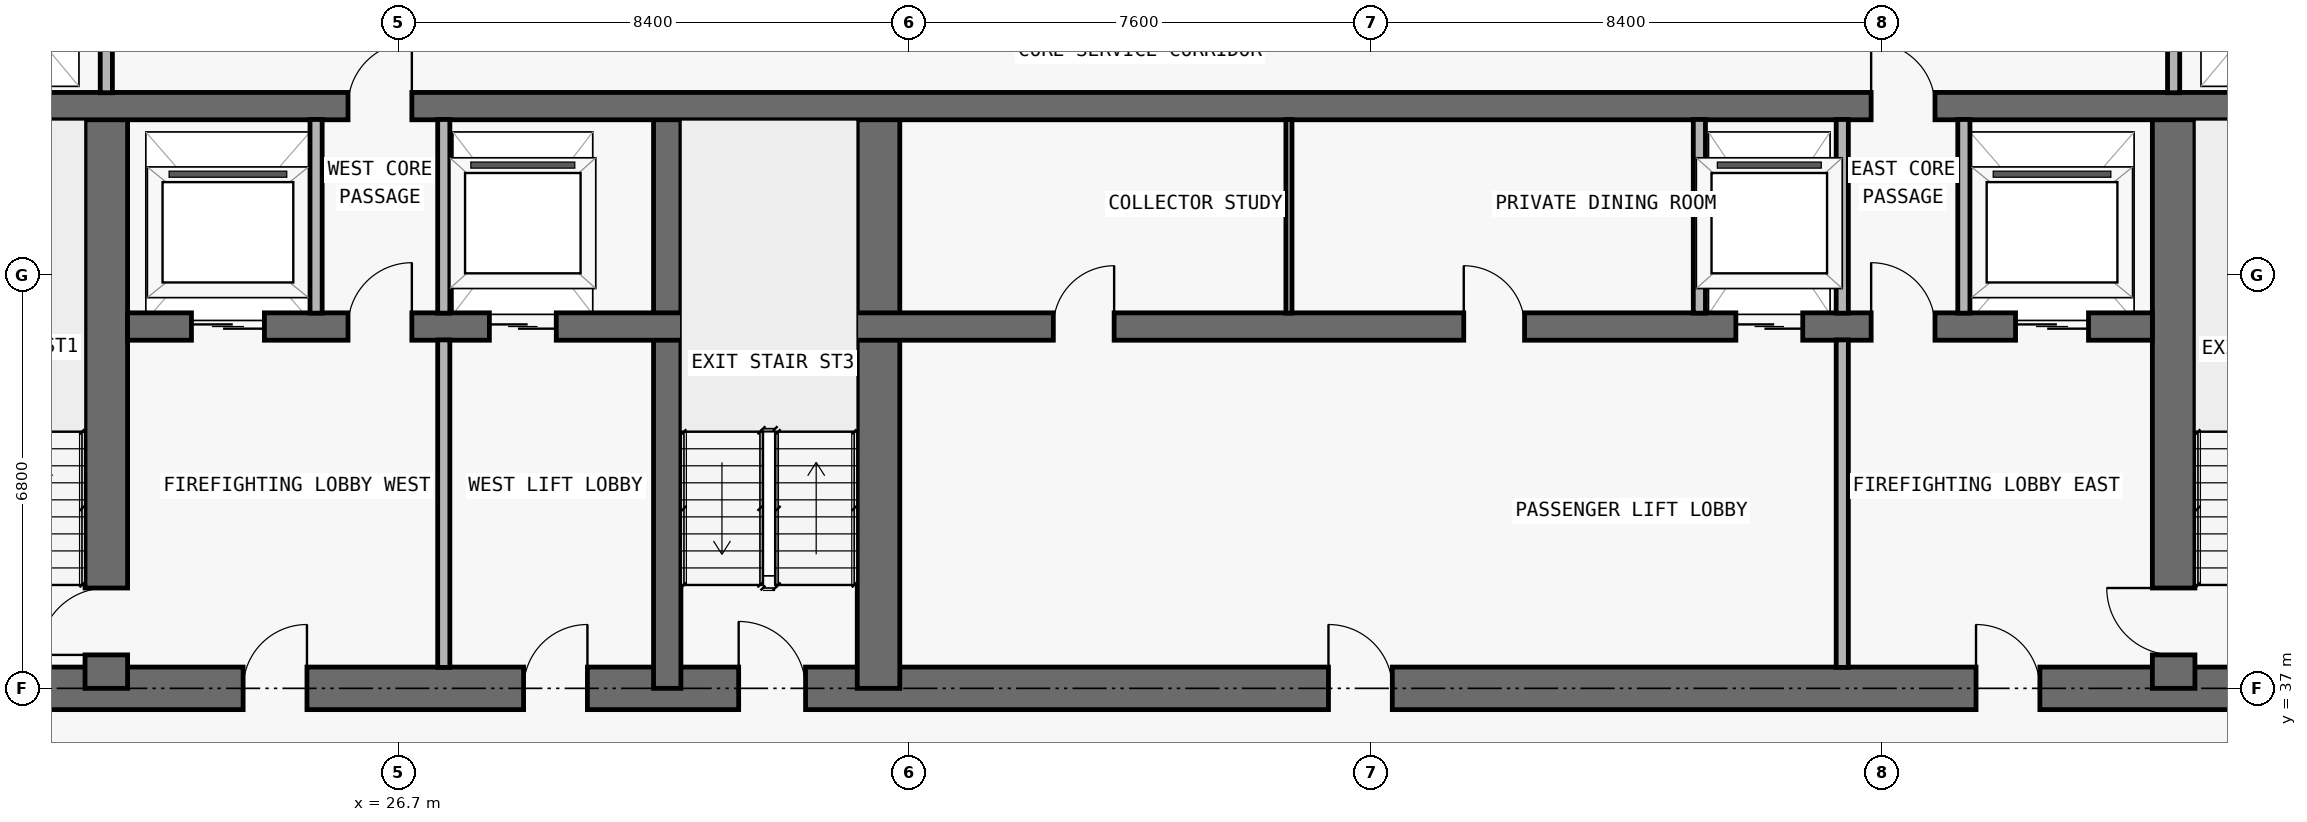
"""IFC4 building model, lengths in metres.
Left out: names, types, materials, properties, quantities, classifications, styles, units other than length and angle.
Written with IfcOpenShell. Run it as: python <this file> out.ifc"""

import sys

from ifc_helpers import new_model, si_unit, direction, frame, frame_2d, origin, place, context, subcontext, project, spatial, rectangle, extrude, element, fill, save


model = new_model("IFC4")
c1 = context("Model", 3, precision=1e-05, world=origin(), true_north=direction((0.0, 1.0)))
c2 = subcontext(c1, "Body", "Model", "MODEL_VIEW")
j1 = project(units=[si_unit("LENGTHUNIT", "METRE"), si_unit("PLANEANGLEUNIT", "RADIAN")], contexts=[c1])
p1 = place(None, origin())
s1 = spatial("IfcSite", under=j1, at=p1, CompositionType="ELEMENT")
p2 = place(p1, origin())
s2 = spatial("IfcBuilding", under=s1, at=p2, CompositionType="ELEMENT")
p3 = place(p2, frame((0.0, 0.0, 195.0)))
s3 = spatial("IfcBuildingStorey", under=s2, at=p3, CompositionType="ELEMENT", Elevation=195.0)
p4 = place(p3, frame((17.95, 37.0, 0.0), z_axis=(0.0, 0.0, 1.0), x_axis=(1.0, 0.0, 0.0)))
e1 = element("IfcWall", 1, at=p4, inside=s3, PredefinedType="SHEAR", context=c2, shape_type="SweptSolid", body=[
    extrude(rectangle(XDim=41.9, YDim=0.7, at=frame_2d((20.95, 0.0))), origin(), (0.0, 0.0, 1.0), 3.05),
])
p5 = place(p4, frame((14.35, 0.0, 0.0)))
e2 = element("IfcOpeningElement", 2, at=p5, cuts=e1, PredefinedType="OPENING", context=c2, shape_type="SweptSolid", body=[
    extrude(rectangle(XDim=1.1, YDim=2.15, at=frame_2d((0.55, 1.075))), frame((0.0, 0.36, 0.0), z_axis=(0.0, -1.0, 0.0), x_axis=(1.0, 0.0, 0.0)), (0.0, 0.0, 1.0), 0.72),
])
p6 = place(p4, frame((6.2, 0.0, 0.0)))
e3 = element("IfcOpeningElement", 3, at=p6, cuts=e1, PredefinedType="OPENING", context=c2, shape_type="SweptSolid", body=[
    extrude(rectangle(XDim=1.05, YDim=2.15, at=frame_2d((0.525, 1.075))), frame((0.0, 0.36, 0.0), z_axis=(0.0, -1.0, 0.0), x_axis=(1.0, 0.0, 0.0)), (0.0, 0.0, 1.0), 0.72),
])
p7 = place(p4, frame((34.7, 0.0, 0.0)))
e4 = element("IfcOpeningElement", 4, at=p7, cuts=e1, PredefinedType="OPENING", context=c2, shape_type="SweptSolid", body=[
    extrude(rectangle(XDim=1.05, YDim=2.15, at=frame_2d((0.525, 1.075))), frame((0.0, 0.36, 0.0), z_axis=(0.0, -1.0, 0.0), x_axis=(1.0, 0.0, 0.0)), (0.0, 0.0, 1.0), 0.72),
])
p8 = place(p4, frame((10.812, 0.0, 0.0)))
e5 = element("IfcOpeningElement", 5, at=p8, cuts=e1, PredefinedType="OPENING", context=c2, shape_type="SweptSolid", body=[
    extrude(rectangle(XDim=1.05, YDim=2.15, at=frame_2d((0.525, 1.075))), frame((0.0, 0.36, 0.0), z_axis=(0.0, -1.0, 0.0), x_axis=(1.0, 0.0, 0.0)), (0.0, 0.0, 1.0), 0.72),
])
p9 = place(p4, frame((24.05, 0.0, 0.0)))
e6 = element("IfcOpeningElement", 6, at=p9, cuts=e1, PredefinedType="OPENING", context=c2, shape_type="SweptSolid", body=[
    extrude(rectangle(XDim=1.05, YDim=2.15, at=frame_2d((0.525, 1.075))), frame((0.0, 0.36, 0.0), z_axis=(0.0, -1.0, 0.0), x_axis=(1.0, 0.0, 0.0)), (0.0, 0.0, 1.0), 0.72),
])
p10 = place(p3, frame((21.9, 37.0, 0.0), z_axis=(0.0, 0.0, 1.0), x_axis=(0.0, 1.0, 0.0)))
e7 = element("IfcWall", 7, at=p10, inside=s3, PredefinedType="SHEAR", context=c2, shape_type="SweptSolid", body=[
    extrude(rectangle(XDim=9.575, YDim=0.7, at=frame_2d((4.788, 0.0))), origin(), (0.0, 0.0, 1.0), 3.05),
])
p11 = place(p10, frame((0.55, 0.0, 0.0)))
e8 = element("IfcOpeningElement", 8, at=p11, cuts=e7, PredefinedType="OPENING", context=c2, shape_type="SweptSolid", body=[
    extrude(rectangle(XDim=1.1, YDim=2.15, at=frame_2d((0.55, 1.075))), frame((0.0, 0.36, 0.0), z_axis=(0.0, -1.0, 0.0), x_axis=(1.0, 0.0, 0.0)), (0.0, 0.0, 1.0), 0.72),
])
p12 = place(p3, frame((55.9, 37.0, 0.0), z_axis=(0.0, 0.0, 1.0), x_axis=(0.0, 1.0, 0.0)))
e9 = element("IfcWall", 9, at=p12, inside=s3, PredefinedType="SHEAR", context=c2, shape_type="SweptSolid", body=[
    extrude(rectangle(XDim=9.575, YDim=0.7, at=frame_2d((4.788, 0.0))), origin(), (0.0, 0.0, 1.0), 3.05),
])
p13 = place(p12, frame((0.55, 0.0, 0.0)))
e10 = element("IfcOpeningElement", 10, at=p13, cuts=e9, PredefinedType="OPENING", context=c2, shape_type="SweptSolid", body=[
    extrude(rectangle(XDim=1.1, YDim=2.15, at=frame_2d((0.55, 1.075))), frame((0.0, 0.36, 0.0), z_axis=(0.0, -1.0, 0.0), x_axis=(1.0, 0.0, 0.0)), (0.0, 0.0, 1.0), 0.72),
])
p14 = place(p3, frame((31.125, 37.0, 0.0), z_axis=(0.0, 0.0, 1.0), x_axis=(0.0, 1.0, 0.0)))
e11 = element("IfcWall", 11, at=p14, inside=s3, PredefinedType="SHEAR", context=c2, shape_type="SweptSolid", body=[
    extrude(rectangle(XDim=9.575, YDim=0.45, at=frame_2d((4.788, 0.0))), origin(), (0.0, 0.0, 1.0), 3.05),
])
p15 = place(p3, frame((34.6, 37.0, 0.0), z_axis=(0.0, 0.0, 1.0), x_axis=(0.0, 1.0, 0.0)))
e12 = element("IfcWall", 12, at=p15, inside=s3, PredefinedType="SHEAR", context=c2, shape_type="SweptSolid", body=[
    extrude(rectangle(XDim=9.575, YDim=0.7, at=frame_2d((4.788, 0.0))), origin(), (0.0, 0.0, 1.0), 3.05),
])
p16 = place(p3, frame((22.25, 42.95, 0.0), z_axis=(0.0, 0.0, 1.0), x_axis=(1.0, 0.0, 0.0)))
e13 = element("IfcWall", 13, at=p16, inside=s3, PredefinedType="SHEAR", context=c2, shape_type="SweptSolid", body=[
    extrude(rectangle(XDim=33.3, YDim=0.45, at=frame_2d((16.65, 0.0))), origin(), (0.0, 0.0, 1.0), 3.05),
])
p17 = place(p16, frame((1.05, 0.0, 0.0)))
e14 = element("IfcOpeningElement", 14, at=p17, cuts=e13, PredefinedType="OPENING", context=c2, shape_type="SweptSolid", body=[
    extrude(rectangle(XDim=1.2, YDim=2.2, at=frame_2d((0.6, 1.1))), frame((0.0, 0.235, 0.0), z_axis=(0.0, -1.0, 0.0), x_axis=(1.0, 0.0, 0.0)), (0.0, 0.0, 1.0), 0.47),
])
p18 = place(p16, frame((31.05, 0.0, 0.0)))
e15 = element("IfcOpeningElement", 15, at=p18, cuts=e13, PredefinedType="OPENING", context=c2, shape_type="SweptSolid", body=[
    extrude(rectangle(XDim=1.2, YDim=2.2, at=frame_2d((0.6, 1.1))), frame((0.0, 0.235, 0.0), z_axis=(0.0, -1.0, 0.0), x_axis=(1.0, 0.0, 0.0)), (0.0, 0.0, 1.0), 0.47),
])
p19 = place(p16, frame((26.45, 0.0, 0.0)))
e16 = element("IfcOpeningElement", 16, at=p19, cuts=e13, PredefinedType="OPENING", context=c2, shape_type="SweptSolid", body=[
    extrude(rectangle(XDim=1.1, YDim=2.2, at=frame_2d((0.55, 1.1))), frame((0.0, 0.235, 0.0), z_axis=(0.0, -1.0, 0.0), x_axis=(1.0, 0.0, 0.0)), (0.0, 0.0, 1.0), 0.47),
])
p20 = place(p16, frame((5.95, 0.0, 0.0)))
e17 = element("IfcOpeningElement", 17, at=p20, cuts=e13, PredefinedType="OPENING", context=c2, shape_type="SweptSolid", body=[
    extrude(rectangle(XDim=1.1, YDim=2.2, at=frame_2d((0.55, 1.1))), frame((0.0, 0.235, 0.0), z_axis=(0.0, -1.0, 0.0), x_axis=(1.0, 0.0, 0.0)), (0.0, 0.0, 1.0), 0.47),
])
p21 = place(p16, frame((3.625, 0.0, 0.0)))
e18 = element("IfcOpeningElement", 18, at=p21, cuts=e13, PredefinedType="OPENING", context=c2, shape_type="SweptSolid", body=[
    extrude(rectangle(XDim=1.05, YDim=2.15, at=frame_2d((0.525, 1.075))), frame((0.0, 0.235, 0.0), z_axis=(0.0, -1.0, 0.0), x_axis=(1.0, 0.0, 0.0)), (0.0, 0.0, 1.0), 0.47),
])
p22 = place(p16, frame((28.675, 0.0, 0.0)))
e19 = element("IfcOpeningElement", 19, at=p22, cuts=e13, PredefinedType="OPENING", context=c2, shape_type="SweptSolid", body=[
    extrude(rectangle(XDim=1.05, YDim=2.15, at=frame_2d((0.525, 1.075))), frame((0.0, 0.235, 0.0), z_axis=(0.0, -1.0, 0.0), x_axis=(1.0, 0.0, 0.0)), (0.0, 0.0, 1.0), 0.47),
])
p23 = place(p16, frame((15.225, 0.0, 0.0)))
e20 = element("IfcOpeningElement", 20, at=p23, cuts=e13, PredefinedType="OPENING", context=c2, shape_type="SweptSolid", body=[
    extrude(rectangle(XDim=1.0, YDim=2.2, at=frame_2d((0.5, 1.1))), frame((0.0, 0.235, 0.0), z_axis=(0.0, -1.0, 0.0), x_axis=(1.0, 0.0, 0.0)), (0.0, 0.0, 1.0), 0.47),
])
p24 = place(p16, frame((21.975, 0.0, 0.0)))
e21 = element("IfcOpeningElement", 21, at=p24, cuts=e13, PredefinedType="OPENING", context=c2, shape_type="SweptSolid", body=[
    extrude(rectangle(XDim=1.0, YDim=2.2, at=frame_2d((0.5, 1.1))), frame((0.0, 0.235, 0.0), z_axis=(0.0, -1.0, 0.0), x_axis=(1.0, 0.0, 0.0)), (0.0, 0.0, 1.0), 0.47),
])
p25 = place(p3, frame((18.3, 46.575, 0.0), z_axis=(0.0, 0.0, 1.0), x_axis=(1.0, 0.0, 0.0)))
e22 = element("IfcWall", 22, at=p25, inside=s3, PredefinedType="SHEAR", context=c2, shape_type="SweptSolid", body=[
    extrude(rectangle(XDim=41.2, YDim=0.45, at=frame_2d((20.6, 0.0))), origin(), (0.0, 0.0, 1.0), 3.05),
])
p26 = place(p25, frame((7.575, 0.0, 0.0)))
e23 = element("IfcOpeningElement", 23, at=p26, cuts=e22, PredefinedType="OPENING", context=c2, shape_type="SweptSolid", body=[
    extrude(rectangle(XDim=1.05, YDim=2.15, at=frame_2d((0.525, 1.075))), frame((0.0, 0.235, 0.0), z_axis=(0.0, -1.0, 0.0), x_axis=(1.0, 0.0, 0.0)), (0.0, 0.0, 1.0), 0.47),
])
p27 = place(p25, frame((32.625, 0.0, 0.0)))
e24 = element("IfcOpeningElement", 24, at=p27, cuts=e22, PredefinedType="OPENING", context=c2, shape_type="SweptSolid", body=[
    extrude(rectangle(XDim=1.05, YDim=2.15, at=frame_2d((0.525, 1.075))), frame((0.0, 0.235, 0.0), z_axis=(0.0, -1.0, 0.0), x_axis=(1.0, 0.0, 0.0)), (0.0, 0.0, 1.0), 0.47),
])
p28 = place(p3, frame((21.9, 46.795, 0.0), z_axis=(0.0, 0.0, 1.0), x_axis=(0.0, 1.0, 0.0)))
e25 = element("IfcWall", 25, at=p28, inside=s3, PredefinedType="PARTITIONING", context=c2, shape_type="SweptSolid", body=[
    extrude(rectangle(XDim=3.16, YDim=0.2, at=frame_2d((1.58, 0.0))), origin(), (0.0, 0.0, 1.0), 3.05),
])
p29 = place(p3, frame((25.35, 43.17, 0.0), z_axis=(0.0, 0.0, 1.0), x_axis=(0.0, 1.0, 0.0)))
e26 = element("IfcWall", 26, at=p29, inside=s3, PredefinedType="PARTITIONING", context=c2, shape_type="SweptSolid", body=[
    extrude(rectangle(XDim=3.185, YDim=0.2, at=frame_2d((1.593, 0.0))), origin(), (0.0, 0.0, 1.0), 3.05),
])
p30 = place(p3, frame((27.45, 37.345, 0.0), z_axis=(0.0, 0.0, 1.0), x_axis=(0.0, 1.0, 0.0)))
e27 = element("IfcWall", 27, at=p30, inside=s3, PredefinedType="PARTITIONING", context=c2, shape_type="SweptSolid", body=[
    extrude(rectangle(XDim=5.385, YDim=0.2, at=frame_2d((2.692, 0.0))), origin(), (0.0, 0.0, 1.0), 3.05),
])
p31 = place(p3, frame((27.45, 43.17, 0.0), z_axis=(0.0, 0.0, 1.0), x_axis=(0.0, 1.0, 0.0)))
e28 = element("IfcWall", 28, at=p31, inside=s3, PredefinedType="PARTITIONING", context=c2, shape_type="SweptSolid", body=[
    extrude(rectangle(XDim=3.185, YDim=0.2, at=frame_2d((1.593, 0.0))), origin(), (0.0, 0.0, 1.0), 3.05),
])
p32 = place(p3, frame((41.35, 43.17, 0.0), z_axis=(0.0, 0.0, 1.0), x_axis=(0.0, 1.0, 0.0)))
e29 = element("IfcWall", 29, at=p32, inside=s3, PredefinedType="MOVABLE", context=c2, shape_type="SweptSolid", body=[
    extrude(rectangle(XDim=3.185, YDim=0.1, at=frame_2d((1.593, 0.0))), origin(), (0.0, 0.0, 1.0), 3.05),
])
p33 = place(p3, frame((48.1, 43.17, 0.0), z_axis=(0.0, 0.0, 1.0), x_axis=(0.0, 1.0, 0.0)))
e30 = element("IfcWall", 30, at=p33, inside=s3, PredefinedType="PARTITIONING", context=c2, shape_type="SweptSolid", body=[
    extrude(rectangle(XDim=3.185, YDim=0.2, at=frame_2d((1.593, 0.0))), origin(), (0.0, 0.0, 1.0), 3.05),
])
p34 = place(p3, frame((50.45, 37.345, 0.0), z_axis=(0.0, 0.0, 1.0), x_axis=(0.0, 1.0, 0.0)))
e31 = element("IfcWall", 31, at=p34, inside=s3, PredefinedType="PARTITIONING", context=c2, shape_type="SweptSolid", body=[
    extrude(rectangle(XDim=5.385, YDim=0.2, at=frame_2d((2.692, 0.0))), origin(), (0.0, 0.0, 1.0), 3.05),
])
for number, where, z_axis, x_axis in (
    (32, (50.45, 43.17, 0.0), (0.0, 0.0, 1.0), (0.0, 1.0, 0.0)),
    (33, (52.45, 43.17, 0.0), (0.0, 0.0, 1.0), (0.0, 1.0, 0.0)),
):
    element("IfcWall", number, at=place(p3, frame(where, z_axis=z_axis, x_axis=x_axis)), inside=s3, PredefinedType="PARTITIONING", context=c2, shape_type="SweptSolid", body=[
        extrude(rectangle(XDim=3.185, YDim=0.2, at=frame_2d((1.593, 0.0))), origin(), (0.0, 0.0, 1.0), 3.05),
    ])
p35 = place(p3, frame((55.9, 46.795, 0.0), z_axis=(0.0, 0.0, 1.0), x_axis=(0.0, 1.0, 0.0)))
e34 = element("IfcWall", 34, at=p35, inside=s3, PredefinedType="PARTITIONING", context=c2, shape_type="SweptSolid", body=[
    extrude(rectangle(XDim=3.16, YDim=0.2, at=frame_2d((1.58, 0.0))), origin(), (0.0, 0.0, 1.0), 3.05),
])
p36 = place(p17, origin())
e35 = element("IfcDoor", 35, at=p36, inside=s3, OperationType="DOUBLE_DOOR_SLIDING", PredefinedType="DOOR", context=c2, shape_type="SweptSolid", body=[
    extrude(rectangle(XDim=1.2, YDim=2.2, at=frame_2d((0.6, 1.1))), frame((0.0, 0.025, 0.0), z_axis=(0.0, -1.0, 0.0), x_axis=(1.0, 0.0, 0.0)), (0.0, 0.0, 1.0), 0.05),
])
fill(e14, e35)
p37 = place(p18, origin())
e36 = element("IfcDoor", 36, at=p37, inside=s3, OperationType="DOUBLE_DOOR_SLIDING", PredefinedType="DOOR", context=c2, shape_type="SweptSolid", body=[
    extrude(rectangle(XDim=1.2, YDim=2.2, at=frame_2d((0.6, 1.1))), frame((0.0, 0.025, 0.0), z_axis=(0.0, -1.0, 0.0), x_axis=(1.0, 0.0, 0.0)), (0.0, 0.0, 1.0), 0.05),
])
fill(e15, e36)
p38 = place(p19, origin())
e37 = element("IfcDoor", 37, at=p38, inside=s3, OperationType="DOUBLE_DOOR_SLIDING", PredefinedType="DOOR", context=c2, shape_type="SweptSolid", body=[
    extrude(rectangle(XDim=1.1, YDim=2.2, at=frame_2d((0.55, 1.1))), frame((0.0, 0.025, 0.0), z_axis=(0.0, -1.0, 0.0), x_axis=(1.0, 0.0, 0.0)), (0.0, 0.0, 1.0), 0.05),
])
fill(e16, e37)
p39 = place(p20, origin())
e38 = element("IfcDoor", 38, at=p39, inside=s3, OperationType="DOUBLE_DOOR_SLIDING", PredefinedType="DOOR", context=c2, shape_type="SweptSolid", body=[
    extrude(rectangle(XDim=1.1, YDim=2.2, at=frame_2d((0.55, 1.1))), frame((0.0, 0.025, 0.0), z_axis=(0.0, -1.0, 0.0), x_axis=(1.0, 0.0, 0.0)), (0.0, 0.0, 1.0), 0.05),
])
fill(e17, e38)
p40 = place(p5, origin())
e39 = element("IfcDoor", 39, at=p40, inside=s3, OperationType="SINGLE_SWING_LEFT", PredefinedType="DOOR", context=c2, shape_type="SweptSolid", body=[
    extrude(rectangle(XDim=1.1, YDim=2.15, at=frame_2d((0.55, 1.075))), frame((0.0, 0.025, 0.0), z_axis=(0.0, -1.0, 0.0), x_axis=(1.0, 0.0, 0.0)), (0.0, 0.0, 1.0), 0.05),
])
fill(e2, e39)
p41 = place(p6, origin())
e40 = element("IfcDoor", 40, at=p41, inside=s3, OperationType="SINGLE_SWING_RIGHT", PredefinedType="DOOR", context=c2, shape_type="SweptSolid", body=[
    extrude(rectangle(XDim=1.05, YDim=2.15, at=frame_2d((0.525, 1.075))), frame((0.0, 0.025, 0.0), z_axis=(0.0, -1.0, 0.0), x_axis=(1.0, 0.0, 0.0)), (0.0, 0.0, 1.0), 0.05),
])
fill(e3, e40)
p42 = place(p11, origin())
e41 = element("IfcDoor", 41, at=p42, inside=s3, OperationType="SINGLE_SWING_LEFT", PredefinedType="DOOR", context=c2, shape_type="SweptSolid", body=[
    extrude(rectangle(XDim=1.1, YDim=2.15, at=frame_2d((0.55, 1.075))), frame((0.0, 0.025, 0.0), z_axis=(0.0, -1.0, 0.0), x_axis=(1.0, 0.0, 0.0)), (0.0, 0.0, 1.0), 0.05),
])
fill(e8, e41)
p43 = place(p21, origin())
e42 = element("IfcDoor", 42, at=p43, inside=s3, OperationType="SINGLE_SWING_RIGHT", PredefinedType="DOOR", context=c2, shape_type="SweptSolid", body=[
    extrude(rectangle(XDim=1.05, YDim=2.15, at=frame_2d((0.525, 1.075))), frame((0.0, 0.025, 0.0), z_axis=(0.0, -1.0, 0.0), x_axis=(1.0, 0.0, 0.0)), (0.0, 0.0, 1.0), 0.05),
])
fill(e18, e42)
p44 = place(p7, origin())
e43 = element("IfcDoor", 43, at=p44, inside=s3, OperationType="SINGLE_SWING_LEFT", PredefinedType="DOOR", context=c2, shape_type="SweptSolid", body=[
    extrude(rectangle(XDim=1.05, YDim=2.15, at=frame_2d((0.525, 1.075))), frame((0.0, 0.025, 0.0), z_axis=(0.0, -1.0, 0.0), x_axis=(1.0, 0.0, 0.0)), (0.0, 0.0, 1.0), 0.05),
])
fill(e4, e43)
p45 = place(p13, origin())
e44 = element("IfcDoor", 44, at=p45, inside=s3, OperationType="SINGLE_SWING_RIGHT", PredefinedType="DOOR", context=c2, shape_type="SweptSolid", body=[
    extrude(rectangle(XDim=1.1, YDim=2.15, at=frame_2d((0.55, 1.075))), frame((0.0, 0.025, 0.0), z_axis=(0.0, -1.0, 0.0), x_axis=(1.0, 0.0, 0.0)), (0.0, 0.0, 1.0), 0.05),
])
fill(e10, e44)
p46 = place(p22, origin())
e45 = element("IfcDoor", 45, at=p46, inside=s3, OperationType="SINGLE_SWING_LEFT", PredefinedType="DOOR", context=c2, shape_type="SweptSolid", body=[
    extrude(rectangle(XDim=1.05, YDim=2.15, at=frame_2d((0.525, 1.075))), frame((0.0, 0.025, 0.0), z_axis=(0.0, -1.0, 0.0), x_axis=(1.0, 0.0, 0.0)), (0.0, 0.0, 1.0), 0.05),
])
fill(e19, e45)
p47 = place(p8, origin())
e46 = element("IfcDoor", 46, at=p47, inside=s3, OperationType="SINGLE_SWING_RIGHT", PredefinedType="DOOR", context=c2, shape_type="SweptSolid", body=[
    extrude(rectangle(XDim=1.05, YDim=2.15, at=frame_2d((0.525, 1.075))), frame((0.0, 0.025, 0.0), z_axis=(0.0, -1.0, 0.0), x_axis=(1.0, 0.0, 0.0)), (0.0, 0.0, 1.0), 0.05),
])
fill(e5, e46)
p48 = place(p9, origin())
e47 = element("IfcDoor", 47, at=p48, inside=s3, OperationType="SINGLE_SWING_LEFT", PredefinedType="DOOR", context=c2, shape_type="SweptSolid", body=[
    extrude(rectangle(XDim=1.05, YDim=2.15, at=frame_2d((0.525, 1.075))), frame((0.0, 0.025, 0.0), z_axis=(0.0, -1.0, 0.0), x_axis=(1.0, 0.0, 0.0)), (0.0, 0.0, 1.0), 0.05),
])
fill(e6, e47)
p49 = place(p23, origin())
e48 = element("IfcDoor", 48, at=p49, inside=s3, OperationType="SINGLE_SWING_RIGHT", PredefinedType="DOOR", context=c2, shape_type="SweptSolid", body=[
    extrude(rectangle(XDim=1.0, YDim=2.2, at=frame_2d((0.5, 1.1))), frame((0.0, 0.025, 0.0), z_axis=(0.0, -1.0, 0.0), x_axis=(1.0, 0.0, 0.0)), (0.0, 0.0, 1.0), 0.05),
])
fill(e20, e48)
p50 = place(p24, origin())
e49 = element("IfcDoor", 49, at=p50, inside=s3, OperationType="SINGLE_SWING_LEFT", PredefinedType="DOOR", context=c2, shape_type="SweptSolid", body=[
    extrude(rectangle(XDim=1.0, YDim=2.2, at=frame_2d((0.5, 1.1))), frame((0.0, 0.025, 0.0), z_axis=(0.0, -1.0, 0.0), x_axis=(1.0, 0.0, 0.0)), (0.0, 0.0, 1.0), 0.05),
])
fill(e21, e49)
p51 = place(p26, origin())
e50 = element("IfcDoor", 50, at=p51, inside=s3, OperationType="SINGLE_SWING_RIGHT", PredefinedType="DOOR", context=c2, shape_type="SweptSolid", body=[
    extrude(rectangle(XDim=1.05, YDim=2.15, at=frame_2d((0.525, 1.075))), frame((0.0, 0.025, 0.0), z_axis=(0.0, -1.0, 0.0), x_axis=(1.0, 0.0, 0.0)), (0.0, 0.0, 1.0), 0.05),
])
fill(e23, e50)
p52 = place(p27, origin())
e51 = element("IfcDoor", 51, at=p52, inside=s3, OperationType="SINGLE_SWING_LEFT", PredefinedType="DOOR", context=c2, shape_type="SweptSolid", body=[
    extrude(rectangle(XDim=1.05, YDim=2.15, at=frame_2d((0.525, 1.075))), frame((0.0, 0.025, 0.0), z_axis=(0.0, -1.0, 0.0), x_axis=(1.0, 0.0, 0.0)), (0.0, 0.0, 1.0), 0.05),
])
fill(e24, e51)
save(model, sys.argv[1])
